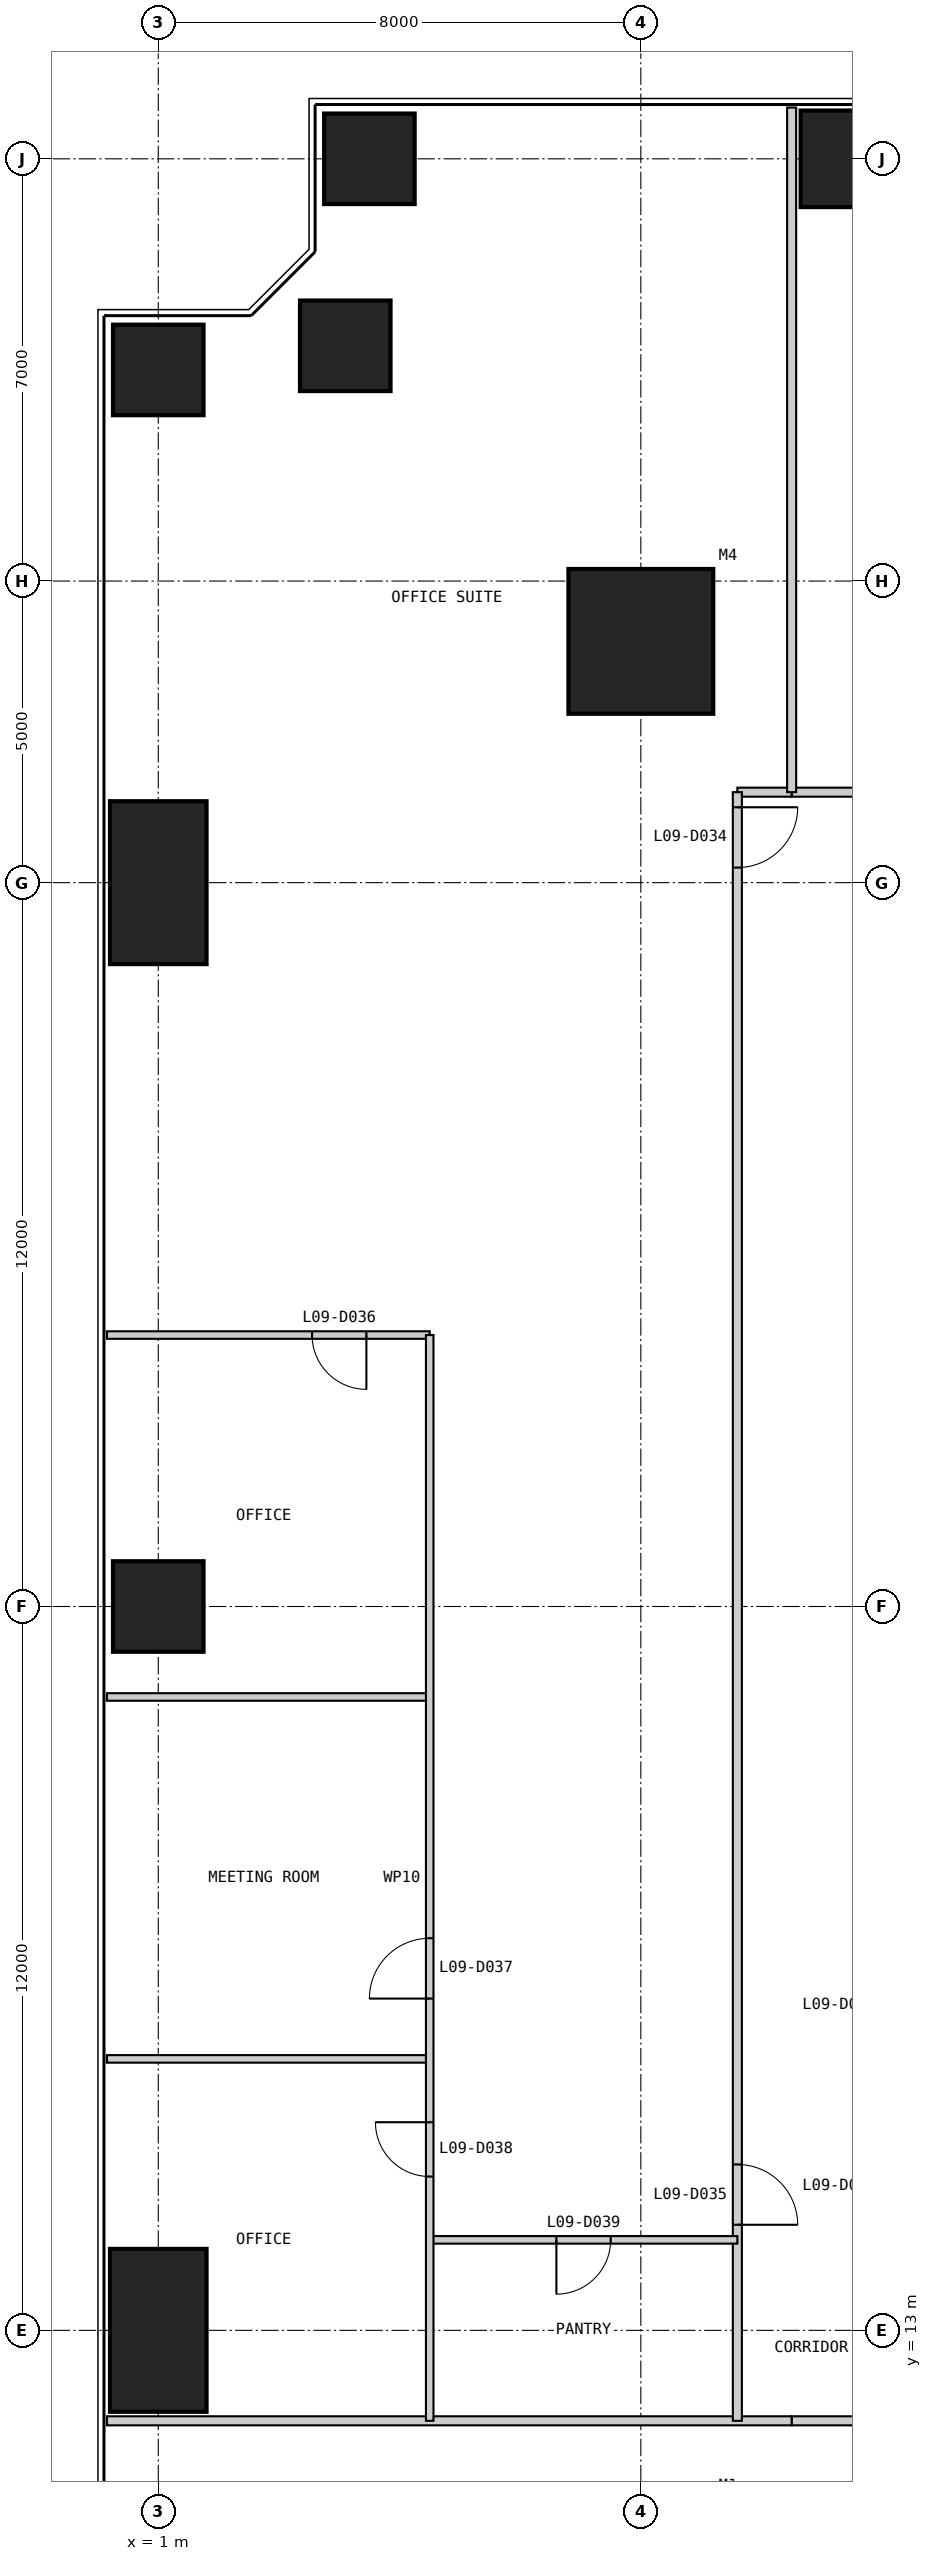
"""IFC4 building model, lengths in metres.
Left out: names, types, materials, properties, quantities, classifications, styles, units other than length and angle.
Written with IfcOpenShell. Run it as: python <this file> out.ifc"""

import sys

from ifc_helpers import new_model, si_unit, direction, frame, frame_2d, origin, origin_2d, place, context, subcontext, project, spatial, rectangle, extrude, element, fill, save


model = new_model("IFC4")
c1 = context("Model", 3, precision=1e-05, world=origin(), true_north=direction((0.0, 1.0)))
c2 = subcontext(c1, "Body", "Model", "MODEL_VIEW")
j1 = project(units=[si_unit("LENGTHUNIT", "METRE"), si_unit("PLANEANGLEUNIT", "RADIAN")], contexts=[c1])
p1 = place(None, origin())
s1 = spatial("IfcSite", under=j1, at=p1, CompositionType="ELEMENT")
p2 = place(p1, origin())
s2 = spatial("IfcBuilding", under=s1, at=p2, CompositionType="ELEMENT")
p3 = place(p2, frame((0.0, 0.0, 43.0)))
s3 = spatial("IfcBuildingStorey", under=s2, at=p3, CompositionType="ELEMENT", Elevation=43.0)
p4 = place(p3, frame((9.0, 41.0, 0.0), z_axis=(0.0, 0.0, 1.0), x_axis=(1.0, 0.0, 0.0)))
e1 = element("IfcColumn", 1, at=p4, inside=s3, PredefinedType="COLUMN", context=c2, shape_type="SweptSolid", body=[
    extrude(rectangle(XDim=2.4, YDim=2.4, at=origin_2d()), origin(), (0.0, 0.0, 1.0), 4.0),
])
p5 = place(p3, frame((13.0, 49.0, 0.0), z_axis=(0.0, 0.0, 1.0), x_axis=(1.0, 0.0, 0.0)))
e2 = element("IfcColumn", 2, at=p5, inside=s3, PredefinedType="COLUMN", context=c2, shape_type="SweptSolid", body=[
    extrude(rectangle(XDim=2.7, YDim=1.6, at=origin_2d()), origin(), (0.0, 0.0, 1.0), 4.0),
])
for number, where, z_axis, x_axis in (
    (3, (4.5, 49.0, 0.0), (0.0, 0.0, 1.0), (1.0, 0.0, 0.0)),
    (4, (4.1, 45.9, 0.0), (0.0, 0.0, 1.0), (1.0, 0.0, 0.0)),
    (5, (1.0, 45.5, 0.0), (0.0, 0.0, 1.0), (1.0, 0.0, 0.0)),
):
    element("IfcColumn", number, at=place(p3, frame(where, z_axis=z_axis, x_axis=x_axis)), inside=s3, PredefinedType="COLUMN", context=c2, shape_type="SweptSolid", body=[
        extrude(rectangle(XDim=1.5, YDim=1.5, at=origin_2d()), origin(), (0.0, 0.0, 1.0), 4.0),
    ])
p6 = place(p3, frame((1.0, 37.0, 0.0), z_axis=(0.0, 0.0, 1.0), x_axis=(1.0, 0.0, 0.0)))
e6 = element("IfcColumn", 6, at=p6, inside=s3, PredefinedType="COLUMN", context=c2, shape_type="SweptSolid", body=[
    extrude(rectangle(XDim=1.6, YDim=2.7, at=origin_2d()), origin(), (0.0, 0.0, 1.0), 4.0),
])
p7 = place(p3, frame((1.0, 25.0, 0.0), z_axis=(0.0, 0.0, 1.0), x_axis=(1.0, 0.0, 0.0)))
e7 = element("IfcColumn", 7, at=p7, inside=s3, PredefinedType="COLUMN", context=c2, shape_type="SweptSolid", body=[
    extrude(rectangle(XDim=1.5, YDim=1.5, at=origin_2d()), origin(), (0.0, 0.0, 1.0), 4.0),
])
p8 = place(p3, frame((1.0, 13.0, 0.0), z_axis=(0.0, 0.0, 1.0), x_axis=(1.0, 0.0, 0.0)))
e8 = element("IfcColumn", 8, at=p8, inside=s3, PredefinedType="COLUMN", context=c2, shape_type="SweptSolid", body=[
    extrude(rectangle(XDim=1.6, YDim=2.7, at=origin_2d()), origin(), (0.0, 0.0, 1.0), 4.0),
])
p9 = place(p3, frame((11.5, 11.5, 0.0), z_axis=(0.0, 0.0, 1.0), x_axis=(1.0, 0.0, 0.0)))
e9 = element("IfcWall", 9, at=p9, inside=s3, PredefinedType="PARTITIONING", context=c2, shape_type="SweptSolid", body=[
    extrude(rectangle(XDim=27.0, YDim=0.15, at=frame_2d((13.5, 0.0))), origin(), (0.0, 0.0, 1.0), 3.85),
])
p10 = place(p9, frame((4.0, 0.0, 0.0)))
e10 = element("IfcOpeningElement", 10, at=p10, cuts=e9, PredefinedType="OPENING", context=c2, shape_type="SweptSolid", body=[
    extrude(rectangle(XDim=1.0, YDim=2.2, at=frame_2d((0.5, 1.1))), frame((0.0, 0.085, 0.0), z_axis=(0.0, -1.0, 0.0), x_axis=(1.0, 0.0, 0.0)), (0.0, 0.0, 1.0), 0.17),
])
p11 = place(p9, frame((10.0, 0.0, 0.0)))
e11 = element("IfcOpeningElement", 11, at=p11, cuts=e9, PredefinedType="OPENING", context=c2, shape_type="SweptSolid", body=[
    extrude(rectangle(XDim=1.0, YDim=2.2, at=frame_2d((0.5, 1.1))), frame((0.0, 0.085, 0.0), z_axis=(0.0, -1.0, 0.0), x_axis=(1.0, 0.0, 0.0)), (0.0, 0.0, 1.0), 0.17),
])
p12 = place(p9, frame((17.5, 0.0, 0.0)))
e12 = element("IfcOpeningElement", 12, at=p12, cuts=e9, PredefinedType="OPENING", context=c2, shape_type="SweptSolid", body=[
    extrude(rectangle(XDim=1.0, YDim=2.2, at=frame_2d((0.5, 1.1))), frame((0.0, 0.085, 0.0), z_axis=(0.0, -1.0, 0.0), x_axis=(1.0, 0.0, 0.0)), (0.0, 0.0, 1.0), 0.17),
])
p13 = place(p9, frame((23.5, 0.0, 0.0)))
e13 = element("IfcOpeningElement", 13, at=p13, cuts=e9, PredefinedType="OPENING", context=c2, shape_type="SweptSolid", body=[
    extrude(rectangle(XDim=1.0, YDim=2.2, at=frame_2d((0.5, 1.1))), frame((0.0, 0.085, 0.0), z_axis=(0.0, -1.0, 0.0), x_axis=(1.0, 0.0, 0.0)), (0.0, 0.0, 1.0), 0.17),
])
p14 = place(p3, frame((0.15, 11.5, 0.0), z_axis=(0.0, 0.0, 1.0), x_axis=(1.0, 0.0, 0.0)))
e14 = element("IfcWall", 14, at=p14, inside=s3, PredefinedType="PARTITIONING", context=c2, shape_type="SweptSolid", body=[
    extrude(rectangle(XDim=11.35, YDim=0.15, at=frame_2d((5.675, 0.0))), origin(), (0.0, 0.0, 1.0), 3.85),
])
p15 = place(p3, frame((38.5, 38.5, 0.0), z_axis=(0.0, 0.0, 1.0), x_axis=(-1.0, 0.0, 0.0)))
e15 = element("IfcWall", 15, at=p15, inside=s3, PredefinedType="PARTITIONING", context=c2, shape_type="SweptSolid", body=[
    extrude(rectangle(XDim=27.0, YDim=0.15, at=frame_2d((13.5, 0.0))), origin(), (0.0, 0.0, 1.0), 3.85),
])
p16 = place(p15, frame((2.5, 0.0, 0.0)))
e16 = element("IfcOpeningElement", 16, at=p16, cuts=e15, PredefinedType="OPENING", context=c2, shape_type="SweptSolid", body=[
    extrude(rectangle(XDim=1.0, YDim=2.2, at=frame_2d((0.5, 1.1))), frame((0.0, 0.085, 0.0), z_axis=(0.0, -1.0, 0.0), x_axis=(1.0, 0.0, 0.0)), (0.0, 0.0, 1.0), 0.17),
])
p17 = place(p15, frame((13.0, 0.0, 0.0)))
e17 = element("IfcOpeningElement", 17, at=p17, cuts=e15, PredefinedType="OPENING", context=c2, shape_type="SweptSolid", body=[
    extrude(rectangle(XDim=1.0, YDim=2.2, at=frame_2d((0.5, 1.1))), frame((0.0, 0.085, 0.0), z_axis=(0.0, -1.0, 0.0), x_axis=(1.0, 0.0, 0.0)), (0.0, 0.0, 1.0), 0.17),
])
p18 = place(p15, frame((23.5, 0.0, 0.0)))
e18 = element("IfcOpeningElement", 18, at=p18, cuts=e15, PredefinedType="OPENING", context=c2, shape_type="SweptSolid", body=[
    extrude(rectangle(XDim=1.0, YDim=2.2, at=frame_2d((0.5, 1.1))), frame((0.0, 0.085, 0.0), z_axis=(0.0, -1.0, 0.0), x_axis=(1.0, 0.0, 0.0)), (0.0, 0.0, 1.0), 0.17),
])
p19 = place(p3, frame((11.5, 38.5, 0.0), z_axis=(0.0, 0.0, 1.0), x_axis=(-1.0, 0.0, 0.0)))
e19 = element("IfcWall", 19, at=p19, inside=s3, PredefinedType="PARTITIONING", context=c2, shape_type="SweptSolid", body=[
    extrude(rectangle(XDim=0.9, YDim=0.15, at=frame_2d((0.45, 0.0))), origin(), (0.0, 0.0, 1.0), 3.85),
])
p20 = place(p3, frame((10.6, 38.5, 0.0), z_axis=(0.0, 0.0, 1.0), x_axis=(0.0, -1.0, 0.0)))
e20 = element("IfcWall", 20, at=p20, inside=s3, PredefinedType="PARTITIONING", context=c2, shape_type="SweptSolid", body=[
    extrude(rectangle(XDim=27.0, YDim=0.15, at=frame_2d((13.5, 0.0))), origin(), (0.0, 0.0, 1.0), 3.85),
])
p21 = place(p20, frame((0.25, 0.0, 0.0)))
e21 = element("IfcOpeningElement", 21, at=p21, cuts=e20, PredefinedType="OPENING", context=c2, shape_type="SweptSolid", body=[
    extrude(rectangle(XDim=1.0, YDim=2.2, at=frame_2d((0.5, 1.1))), frame((0.0, 0.085, 0.0), z_axis=(0.0, -1.0, 0.0), x_axis=(1.0, 0.0, 0.0)), (0.0, 0.0, 1.0), 0.17),
])
p22 = place(p20, frame((22.75, 0.0, 0.0)))
e22 = element("IfcOpeningElement", 22, at=p22, cuts=e20, PredefinedType="OPENING", context=c2, shape_type="SweptSolid", body=[
    extrude(rectangle(XDim=1.0, YDim=2.2, at=frame_2d((0.5, 1.1))), frame((0.0, 0.085, 0.0), z_axis=(0.0, -1.0, 0.0), x_axis=(1.0, 0.0, 0.0)), (0.0, 0.0, 1.0), 0.17),
])
p23 = place(p3, frame((11.5, 49.85, 0.0), z_axis=(0.0, 0.0, 1.0), x_axis=(0.0, -1.0, 0.0)))
e23 = element("IfcWall", 23, at=p23, inside=s3, PredefinedType="PARTITIONING", context=c2, shape_type="SweptSolid", body=[
    extrude(rectangle(XDim=11.35, YDim=0.15, at=frame_2d((5.675, 0.0))), origin(), (0.0, 0.0, 1.0), 3.85),
])
p24 = place(p3, frame((0.15, 29.5, 0.0), z_axis=(0.0, 0.0, 1.0), x_axis=(1.0, 0.0, 0.0)))
e24 = element("IfcWall", 24, at=p24, inside=s3, PredefinedType="PARTITIONING", context=c2, shape_type="SweptSolid", body=[
    extrude(rectangle(XDim=5.35, YDim=0.125, at=frame_2d((2.675, 0.0))), origin(), (0.0, 0.0, 1.0), 3.85),
])
p25 = place(p24, frame((3.4, 0.0, 0.0)))
e25 = element("IfcOpeningElement", 25, at=p25, cuts=e24, PredefinedType="OPENING", context=c2, shape_type="SweptSolid", body=[
    extrude(rectangle(XDim=0.9, YDim=2.2, at=frame_2d((0.45, 1.1))), frame((0.0, 0.073, 0.0), z_axis=(0.0, -1.0, 0.0), x_axis=(1.0, 0.0, 0.0)), (0.0, 0.0, 1.0), 0.145),
])
for number, where, z_axis, x_axis in (
    (26, (0.15, 23.5, 0.0), (0.0, 0.0, 1.0), (1.0, 0.0, 0.0)),
    (27, (0.15, 17.5, 0.0), (0.0, 0.0, 1.0), (1.0, 0.0, 0.0)),
):
    element("IfcWall", number, at=place(p3, frame(where, z_axis=z_axis, x_axis=x_axis)), inside=s3, PredefinedType="PARTITIONING", context=c2, shape_type="SweptSolid", body=[
        extrude(rectangle(XDim=5.35, YDim=0.125, at=frame_2d((2.675, 0.0))), origin(), (0.0, 0.0, 1.0), 3.85),
    ])
p26 = place(p3, frame((5.5, 14.5, 0.0), z_axis=(0.0, 0.0, 1.0), x_axis=(1.0, 0.0, 0.0)))
e28 = element("IfcWall", 28, at=p26, inside=s3, PredefinedType="PARTITIONING", context=c2, shape_type="SweptSolid", body=[
    extrude(rectangle(XDim=5.1, YDim=0.125, at=frame_2d((2.55, 0.0))), origin(), (0.0, 0.0, 1.0), 3.85),
])
p27 = place(p26, frame((2.1, 0.0, 0.0)))
e29 = element("IfcOpeningElement", 29, at=p27, cuts=e28, PredefinedType="OPENING", context=c2, shape_type="SweptSolid", body=[
    extrude(rectangle(XDim=0.9, YDim=2.2, at=frame_2d((0.45, 1.1))), frame((0.0, 0.073, 0.0), z_axis=(0.0, -1.0, 0.0), x_axis=(1.0, 0.0, 0.0)), (0.0, 0.0, 1.0), 0.145),
])
p28 = place(p3, frame((5.5, 29.5, 0.0), z_axis=(0.0, 0.0, 1.0), x_axis=(0.0, -1.0, 0.0)))
e30 = element("IfcWall", 30, at=p28, inside=s3, PredefinedType="PARTITIONING", context=c2, shape_type="SweptSolid", body=[
    extrude(rectangle(XDim=18.0, YDim=0.125, at=frame_2d((9.0, 0.0))), origin(), (0.0, 0.0, 1.0), 3.85),
])
p29 = place(p28, frame((10.0, 0.0, 0.0)))
e31 = element("IfcOpeningElement", 31, at=p29, cuts=e30, PredefinedType="OPENING", context=c2, shape_type="SweptSolid", body=[
    extrude(rectangle(XDim=1.0, YDim=2.2, at=frame_2d((0.5, 1.1))), frame((0.0, 0.073, 0.0), z_axis=(0.0, -1.0, 0.0), x_axis=(1.0, 0.0, 0.0)), (0.0, 0.0, 1.0), 0.145),
])
p30 = place(p28, frame((13.05, 0.0, 0.0)))
e32 = element("IfcOpeningElement", 32, at=p30, cuts=e30, PredefinedType="OPENING", context=c2, shape_type="SweptSolid", body=[
    extrude(rectangle(XDim=0.9, YDim=2.2, at=frame_2d((0.45, 1.1))), frame((0.0, 0.073, 0.0), z_axis=(0.0, -1.0, 0.0), x_axis=(1.0, 0.0, 0.0)), (0.0, 0.0, 1.0), 0.145),
])
p31 = place(p21, origin())
e33 = element("IfcDoor", 33, at=p31, inside=s3, OperationType="SINGLE_SWING_LEFT", PredefinedType="DOOR", context=c2, shape_type="SweptSolid", body=[
    extrude(rectangle(XDim=1.0, YDim=2.2, at=frame_2d((0.5, 1.1))), frame((0.0, 0.025, 0.0), z_axis=(0.0, -1.0, 0.0), x_axis=(1.0, 0.0, 0.0)), (0.0, 0.0, 1.0), 0.05),
])
fill(e21, e33)
p32 = place(p22, origin())
e34 = element("IfcDoor", 34, at=p32, inside=s3, OperationType="SINGLE_SWING_RIGHT", PredefinedType="DOOR", context=c2, shape_type="SweptSolid", body=[
    extrude(rectangle(XDim=1.0, YDim=2.2, at=frame_2d((0.5, 1.1))), frame((0.0, 0.025, 0.0), z_axis=(0.0, -1.0, 0.0), x_axis=(1.0, 0.0, 0.0)), (0.0, 0.0, 1.0), 0.05),
])
fill(e22, e34)
p33 = place(p25, frame((0.9, 0.0, 0.0), z_axis=(0.0, 0.0, 1.0), x_axis=(-1.0, 0.0, 0.0)))
e35 = element("IfcDoor", 35, at=p33, inside=s3, OperationType="SINGLE_SWING_LEFT", PredefinedType="DOOR", context=c2, shape_type="SweptSolid", body=[
    extrude(rectangle(XDim=0.9, YDim=2.2, at=frame_2d((0.45, 1.1))), frame((0.0, 0.025, 0.0), z_axis=(0.0, -1.0, 0.0), x_axis=(1.0, 0.0, 0.0)), (0.0, 0.0, 1.0), 0.05),
])
fill(e25, e35)
p34 = place(p29, frame((1.0, 0.0, 0.0), z_axis=(0.0, 0.0, 1.0), x_axis=(-1.0, 0.0, 0.0)))
e36 = element("IfcDoor", 36, at=p34, inside=s3, OperationType="SINGLE_SWING_LEFT", PredefinedType="DOOR", context=c2, shape_type="SweptSolid", body=[
    extrude(rectangle(XDim=1.0, YDim=2.2, at=frame_2d((0.5, 1.1))), frame((0.0, 0.025, 0.0), z_axis=(0.0, -1.0, 0.0), x_axis=(1.0, 0.0, 0.0)), (0.0, 0.0, 1.0), 0.05),
])
fill(e31, e36)
p35 = place(p30, frame((0.9, 0.0, 0.0), z_axis=(0.0, 0.0, 1.0), x_axis=(-1.0, 0.0, 0.0)))
e37 = element("IfcDoor", 37, at=p35, inside=s3, OperationType="SINGLE_SWING_RIGHT", PredefinedType="DOOR", context=c2, shape_type="SweptSolid", body=[
    extrude(rectangle(XDim=0.9, YDim=2.2, at=frame_2d((0.45, 1.1))), frame((0.0, 0.025, 0.0), z_axis=(0.0, -1.0, 0.0), x_axis=(1.0, 0.0, 0.0)), (0.0, 0.0, 1.0), 0.05),
])
fill(e32, e37)
p36 = place(p27, frame((0.9, 0.0, 0.0), z_axis=(0.0, 0.0, 1.0), x_axis=(-1.0, 0.0, 0.0)))
e38 = element("IfcDoor", 38, at=p36, inside=s3, OperationType="SINGLE_SWING_RIGHT", PredefinedType="DOOR", context=c2, shape_type="SweptSolid", body=[
    extrude(rectangle(XDim=0.9, YDim=2.2, at=frame_2d((0.45, 1.1))), frame((0.0, 0.025, 0.0), z_axis=(0.0, -1.0, 0.0), x_axis=(1.0, 0.0, 0.0)), (0.0, 0.0, 1.0), 0.05),
])
fill(e29, e38)
save(model, sys.argv[1])
